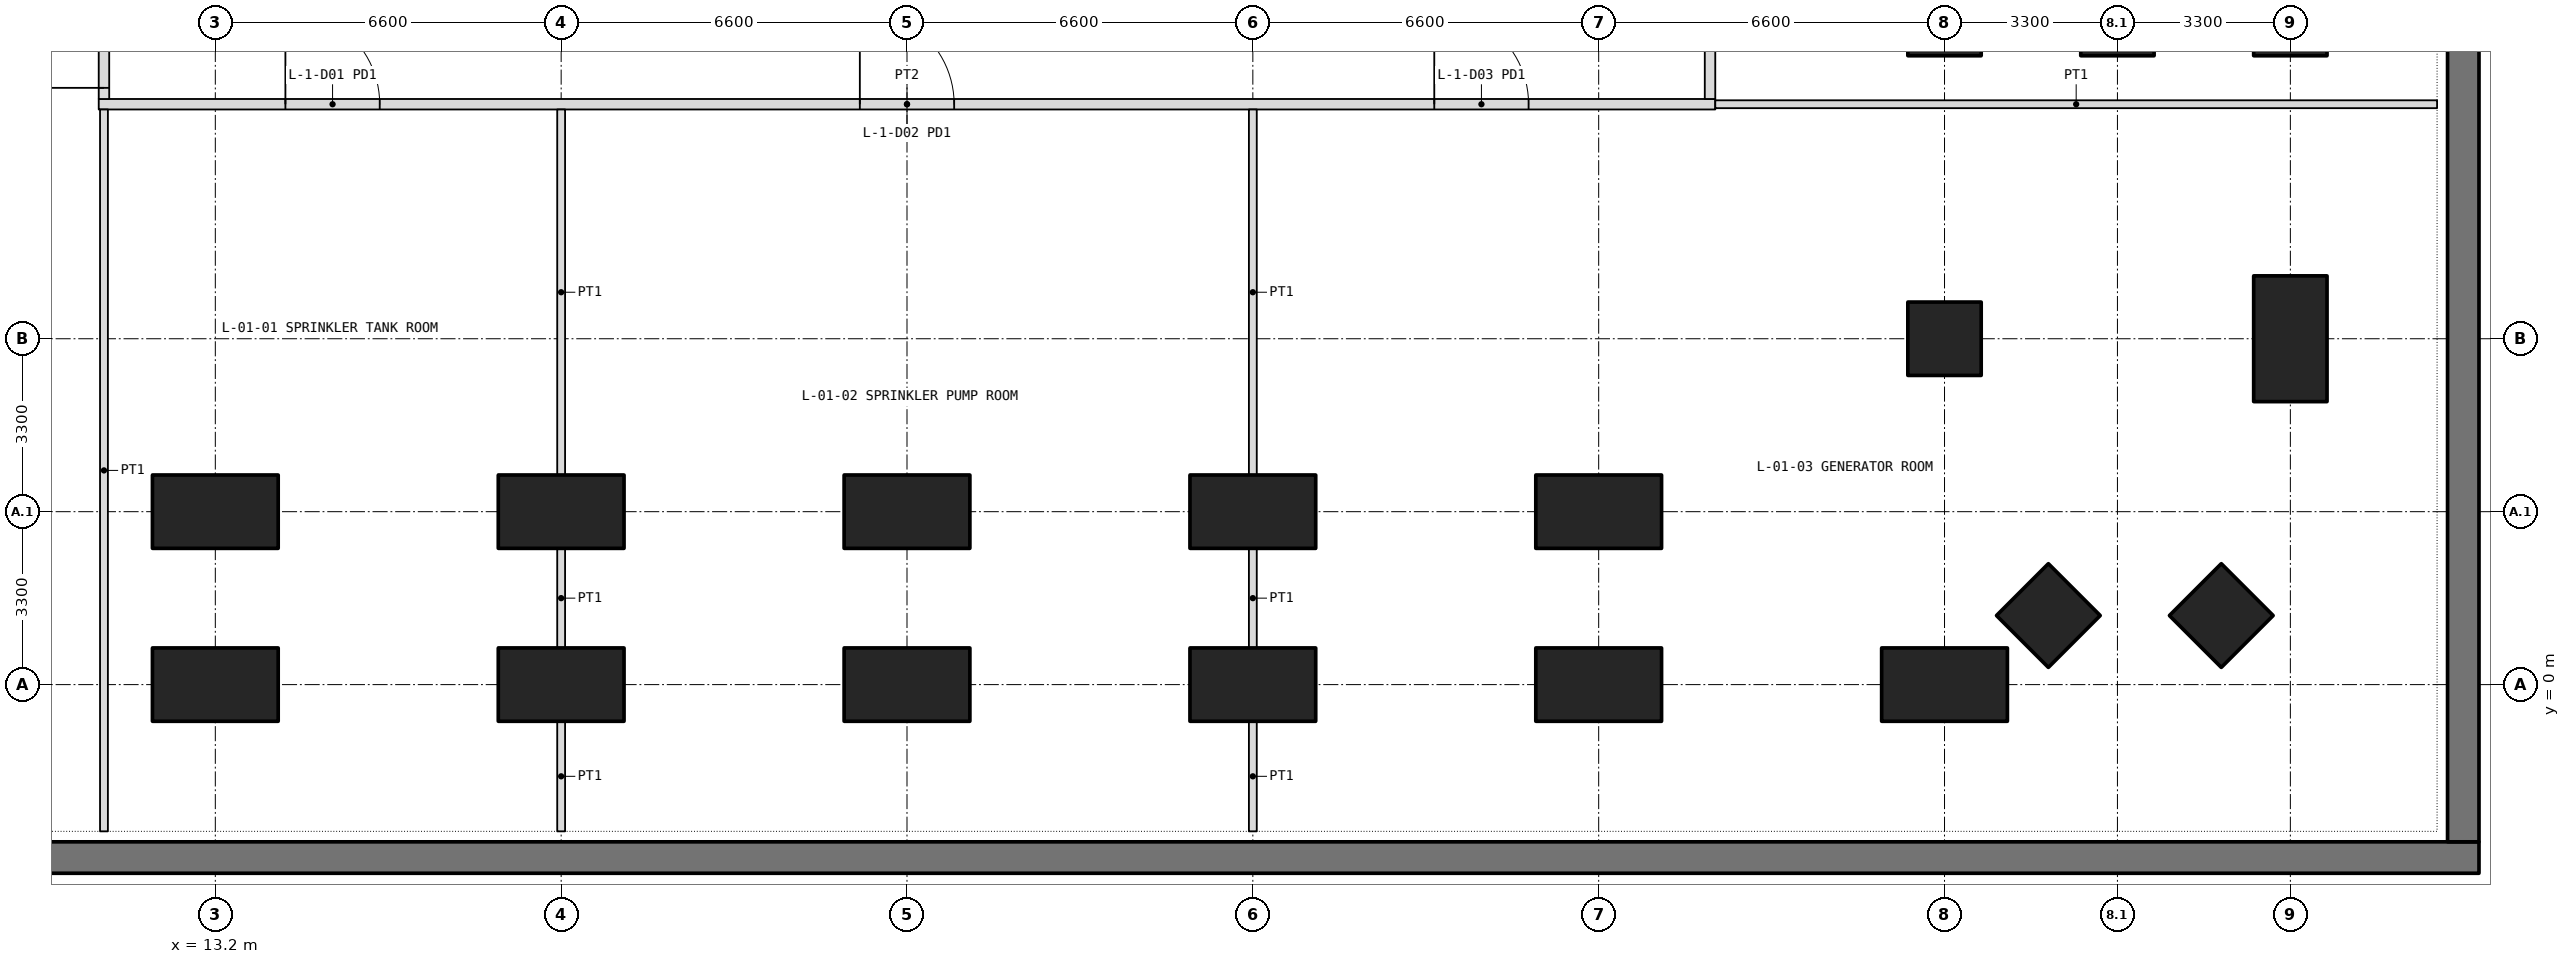
"""IFC4 building model, lengths in metres.
Left out: names, types, materials, properties, quantities, classifications, styles, units other than length and angle.
Written with IfcOpenShell. Run it as: python <this file> out.ifc"""

import sys

from ifc_helpers import new_model, si_unit, direction, frame, frame_2d, origin, origin_2d, place, context, subcontext, project, spatial, rectangle, extrude, element, fill, save


model = new_model("IFC4")
c1 = context("Model", 3, precision=1e-05, world=origin(), true_north=direction((0.0, 1.0)))
c2 = subcontext(c1, "Body", "Model", "MODEL_VIEW")
j1 = project(units=[si_unit("LENGTHUNIT", "METRE"), si_unit("PLANEANGLEUNIT", "RADIAN")], contexts=[c1])
p1 = place(None, origin())
s1 = spatial("IfcSite", under=j1, at=p1, CompositionType="ELEMENT")
p2 = place(p1, origin())
s2 = spatial("IfcBuilding", under=s1, at=p2, CompositionType="ELEMENT")
p3 = place(p2, frame((0.0, 0.0, -5.4)))
s3 = spatial("IfcBuildingStorey", under=s2, at=p3, CompositionType="ELEMENT", Elevation=-5.4)
p4 = place(p3, frame((-3.6, -3.3, -0.15), z_axis=(0.0, 0.0, 1.0), x_axis=(1.0, 0.0, 0.0)))
e1 = element("IfcWall", 1, at=p4, inside=s3, PredefinedType="SOLIDWALL", context=c2, shape_type="SweptSolid", body=[
    extrude(rectangle(XDim=60.0, YDim=0.6, at=frame_2d((30.0, 0.0))), origin(), (0.0, 0.0, 1.0), 5.2),
])
p5 = place(p3, frame((56.1, -3.0, -0.15), z_axis=(0.0, 0.0, 1.0), x_axis=(0.0, 1.0, 0.0)))
e2 = element("IfcWall", 2, at=p5, inside=s3, PredefinedType="SOLIDWALL", context=c2, shape_type="SweptSolid", body=[
    extrude(rectangle(XDim=52.2, YDim=0.6, at=frame_2d((26.1, 0.0))), origin(), (0.0, 0.0, 1.0), 5.2),
])
p6 = place(p3, frame((51.482, 1.318, -0.15), z_axis=(0.0, 0.0, 1.0), x_axis=(0.707106781187, 0.707106781187, 0.0)))
e3 = element("IfcColumn", 3, at=p6, inside=s3, PredefinedType="COLUMN", context=c2, shape_type="SweptSolid", body=[
    extrude(rectangle(XDim=1.4, YDim=1.4, at=origin_2d()), origin(), (0.0, 0.0, 1.0), 5.55),
])
for number, where, z_axis, x_axis in (
    (4, (13.2, 0.0, -0.15), (0.0, 0.0, 1.0), (1.0, 0.0, 0.0)),
    (5, (19.8, 0.0, -0.15), (0.0, 0.0, 1.0), (1.0, 0.0, 0.0)),
    (6, (26.4, 0.0, -0.15), (0.0, 0.0, 1.0), (1.0, 0.0, 0.0)),
    (7, (33.0, 0.0, -0.15), (0.0, 0.0, 1.0), (1.0, 0.0, 0.0)),
    (8, (39.6, 0.0, -0.15), (0.0, 0.0, 1.0), (1.0, 0.0, 0.0)),
    (9, (46.2, 0.0, -0.15), (0.0, 0.0, 1.0), (1.0, 0.0, 0.0)),
    (10, (52.8, 6.6, -0.15), (0.0, 0.0, 1.0), (0.0, 1.0, 0.0)),
    (11, (52.8, 13.2, -0.15), (0.0, 0.0, 1.0), (0.0, 1.0, 0.0)),
):
    element("IfcColumn", number, at=place(p3, frame(where, z_axis=z_axis, x_axis=x_axis)), inside=s3, PredefinedType="COLUMN", context=c2, shape_type="SweptSolid", body=[
        extrude(rectangle(XDim=2.4, YDim=1.4, at=origin_2d()), origin(), (0.0, 0.0, 1.0), 5.55),
    ])
for number, where, z_axis, x_axis in (
    (12, (46.2, 6.6, -0.15), (0.0, 0.0, 1.0), (1.0, 0.0, 0.0)),
    (13, (48.182, 1.318, -0.15), (0.0, 0.0, 1.0), (0.707, 0.707, 0.0)),
):
    element("IfcColumn", number, at=place(p3, frame(where, z_axis=z_axis, x_axis=x_axis)), inside=s3, PredefinedType="COLUMN", context=c2, shape_type="SweptSolid", body=[
        extrude(rectangle(XDim=1.4, YDim=1.4, at=origin_2d()), origin(), (0.0, 0.0, 1.0), 5.55),
    ])
for number, where, z_axis, x_axis in (
    (14, (49.5, 13.2, -0.15), (0.0, 0.0, 1.0), (0.0, 1.0, 0.0)),
    (15, (13.2, 3.3, -0.15), (0.0, 0.0, 1.0), (1.0, 0.0, 0.0)),
    (16, (19.8, 3.3, -0.15), (0.0, 0.0, 1.0), (1.0, 0.0, 0.0)),
    (17, (26.4, 3.3, -0.15), (0.0, 0.0, 1.0), (1.0, 0.0, 0.0)),
    (18, (33.0, 3.3, -0.15), (0.0, 0.0, 1.0), (1.0, 0.0, 0.0)),
    (19, (39.6, 3.3, -0.15), (0.0, 0.0, 1.0), (1.0, 0.0, 0.0)),
    (20, (46.2, 13.2, -0.15), (0.0, 0.0, 1.0), (0.0, 1.0, 0.0)),
):
    element("IfcColumn", number, at=place(p3, frame(where, z_axis=z_axis, x_axis=x_axis)), inside=s3, PredefinedType="COLUMN", context=c2, shape_type="SweptSolid", body=[
        extrude(rectangle(XDim=2.4, YDim=1.4, at=origin_2d()), origin(), (0.0, 0.0, 1.0), 5.55),
    ])
p7 = place(p3, frame((10.975, 11.075, 0.0), z_axis=(0.0, 0.0, 1.0), x_axis=(1.0, 0.0, 0.0)))
e21 = element("IfcWall", 21, at=p7, inside=s3, PredefinedType="PARTITIONING", context=c2, shape_type="SweptSolid", body=[
    extrude(rectangle(XDim=30.85, YDim=0.2, at=frame_2d((15.425, 0.0))), origin(), (0.0, 0.0, 1.0), 4.05),
])
p8 = place(p7, frame((3.562, 0.0, 0.0)))
e22 = element("IfcOpeningElement", 22, at=p8, cuts=e21, PredefinedType="OPENING", context=c2, shape_type="SweptSolid", body=[
    extrude(rectangle(XDim=1.8, YDim=2.4, at=frame_2d((0.9, 1.2))), frame((0.0, 0.11, 0.0), z_axis=(0.0, -1.0, 0.0), x_axis=(1.0, 0.0, 0.0)), (0.0, 0.0, 1.0), 0.22),
])
p9 = place(p7, frame((14.525, 0.0, 0.0)))
e23 = element("IfcOpeningElement", 23, at=p9, cuts=e21, PredefinedType="OPENING", context=c2, shape_type="SweptSolid", body=[
    extrude(rectangle(XDim=1.8, YDim=2.4, at=frame_2d((0.9, 1.2))), frame((0.0, 0.11, 0.0), z_axis=(0.0, -1.0, 0.0), x_axis=(1.0, 0.0, 0.0)), (0.0, 0.0, 1.0), 0.22),
])
p10 = place(p7, frame((25.488, 0.0, 0.0)))
e24 = element("IfcOpeningElement", 24, at=p10, cuts=e21, PredefinedType="OPENING", context=c2, shape_type="SweptSolid", body=[
    extrude(rectangle(XDim=1.8, YDim=2.4, at=frame_2d((0.9, 1.2))), frame((0.0, 0.11, 0.0), z_axis=(0.0, -1.0, 0.0), x_axis=(1.0, 0.0, 0.0)), (0.0, 0.0, 1.0), 0.22),
])
p11 = place(p3, frame((11.075, 11.175, 0.0), z_axis=(0.0, 0.0, 1.0), x_axis=(0.0, 1.0, 0.0)))
e25 = element("IfcWall", 25, at=p11, inside=s3, PredefinedType="PARTITIONING", context=c2, shape_type="SweptSolid", body=[
    extrude(rectangle(XDim=23.85, YDim=0.2, at=frame_2d((11.925, 0.0))), origin(), (0.0, 0.0, 1.0), 4.05),
])
p12 = place(p11, frame((0.212, 0.0, 0.0)))
e26 = element("IfcOpeningElement", 26, at=p12, cuts=e25, PredefinedType="OPENING", context=c2, shape_type="SweptSolid", body=[
    extrude(rectangle(XDim=1.8, YDim=2.4, at=frame_2d((0.9, 1.2))), frame((0.0, 0.11, 0.0), z_axis=(0.0, -1.0, 0.0), x_axis=(1.0, 0.0, 0.0)), (0.0, 0.0, 1.0), 0.22),
])
p13 = place(p11, frame((2.575, 0.0, 0.0)))
e27 = element("IfcOpeningElement", 27, at=p13, cuts=e25, PredefinedType="OPENING", context=c2, shape_type="SweptSolid", body=[
    extrude(rectangle(XDim=1.0, YDim=2.1, at=frame_2d((0.5, 1.05))), frame((0.0, 0.11, 0.0), z_axis=(0.0, -1.0, 0.0), x_axis=(1.0, 0.0, 0.0)), (0.0, 0.0, 1.0), 0.22),
])
p14 = place(p11, frame((5.675, 0.0, 0.0)))
e28 = element("IfcOpeningElement", 28, at=p14, cuts=e25, PredefinedType="OPENING", context=c2, shape_type="SweptSolid", body=[
    extrude(rectangle(XDim=0.9, YDim=2.1, at=frame_2d((0.45, 1.05))), frame((0.0, 0.11, 0.0), z_axis=(0.0, -1.0, 0.0), x_axis=(1.0, 0.0, 0.0)), (0.0, 0.0, 1.0), 0.22),
])
p15 = place(p11, frame((9.575, 0.0, 0.0)))
e29 = element("IfcOpeningElement", 29, at=p15, cuts=e25, PredefinedType="OPENING", context=c2, shape_type="SweptSolid", body=[
    extrude(rectangle(XDim=0.9, YDim=2.1, at=frame_2d((0.45, 1.05))), frame((0.0, 0.11, 0.0), z_axis=(0.0, -1.0, 0.0), x_axis=(1.0, 0.0, 0.0)), (0.0, 0.0, 1.0), 0.22),
])
p16 = place(p11, frame((12.675, 0.0, 0.0)))
e30 = element("IfcOpeningElement", 30, at=p16, cuts=e25, PredefinedType="OPENING", context=c2, shape_type="SweptSolid", body=[
    extrude(rectangle(XDim=1.8, YDim=2.4, at=frame_2d((0.9, 1.2))), frame((0.0, 0.11, 0.0), z_axis=(0.0, -1.0, 0.0), x_axis=(1.0, 0.0, 0.0)), (0.0, 0.0, 1.0), 0.22),
])
p17 = place(p11, frame((19.087, 0.0, 0.0)))
e31 = element("IfcOpeningElement", 31, at=p17, cuts=e25, PredefinedType="OPENING", context=c2, shape_type="SweptSolid", body=[
    extrude(rectangle(XDim=1.0, YDim=2.1, at=frame_2d((0.5, 1.05))), frame((0.0, 0.11, 0.0), z_axis=(0.0, -1.0, 0.0), x_axis=(1.0, 0.0, 0.0)), (0.0, 0.0, 1.0), 0.22),
])
p18 = place(p3, frame((41.725, 11.175, 0.0), z_axis=(0.0, 0.0, 1.0), x_axis=(0.0, 1.0, 0.0)))
e32 = element("IfcWall", 32, at=p18, inside=s3, PredefinedType="PARTITIONING", context=c2, shape_type="SweptSolid", body=[
    extrude(rectangle(XDim=23.85, YDim=0.2, at=frame_2d((11.925, 0.0))), origin(), (0.0, 0.0, 1.0), 4.05),
])
p19 = place(p18, frame((3.363, 0.0, 0.0)))
e33 = element("IfcOpeningElement", 33, at=p19, cuts=e32, PredefinedType="OPENING", context=c2, shape_type="SweptSolid", body=[
    extrude(rectangle(XDim=1.8, YDim=2.4, at=frame_2d((0.9, 1.2))), frame((0.0, 0.11, 0.0), z_axis=(0.0, -1.0, 0.0), x_axis=(1.0, 0.0, 0.0)), (0.0, 0.0, 1.0), 0.22),
])
p20 = place(p18, frame((9.625, 0.0, 0.0)))
e34 = element("IfcOpeningElement", 34, at=p20, cuts=e32, PredefinedType="OPENING", context=c2, shape_type="SweptSolid", body=[
    extrude(rectangle(XDim=1.0, YDim=2.1, at=frame_2d((0.5, 1.05))), frame((0.0, 0.11, 0.0), z_axis=(0.0, -1.0, 0.0), x_axis=(1.0, 0.0, 0.0)), (0.0, 0.0, 1.0), 0.22),
])
p21 = place(p18, frame((12.975, 0.0, 0.0)))
e35 = element("IfcOpeningElement", 35, at=p21, cuts=e32, PredefinedType="OPENING", context=c2, shape_type="SweptSolid", body=[
    extrude(rectangle(XDim=0.9, YDim=2.1, at=frame_2d((0.45, 1.05))), frame((0.0, 0.11, 0.0), z_axis=(0.0, -1.0, 0.0), x_axis=(1.0, 0.0, 0.0)), (0.0, 0.0, 1.0), 0.22),
])
p22 = place(p18, frame((18.025, 0.0, 0.0)))
e36 = element("IfcOpeningElement", 36, at=p22, cuts=e32, PredefinedType="OPENING", context=c2, shape_type="SweptSolid", body=[
    extrude(rectangle(XDim=1.0, YDim=2.1, at=frame_2d((0.5, 1.05))), frame((0.0, 0.11, 0.0), z_axis=(0.0, -1.0, 0.0), x_axis=(1.0, 0.0, 0.0)), (0.0, 0.0, 1.0), 0.22),
])
p23 = place(p18, frame((22.387, 0.0, 0.0)))
e37 = element("IfcOpeningElement", 37, at=p23, cuts=e32, PredefinedType="OPENING", context=c2, shape_type="SweptSolid", body=[
    extrude(rectangle(XDim=1.0, YDim=2.1, at=frame_2d((0.5, 1.05))), frame((0.0, 0.11, 0.0), z_axis=(0.0, -1.0, 0.0), x_axis=(1.0, 0.0, 0.0)), (0.0, 0.0, 1.0), 0.22),
])
for number, where, z_axis, x_axis in (
    (38, (11.075, -2.8, 0.0), (0.0, 0.0, 1.0), (0.0, 1.0, 0.0)),
    (39, (55.6, 11.075, 0.0), (0.0, 0.0, 1.0), (-1.0, 0.0, 0.0)),
):
    element("IfcWall", number, at=place(p3, frame(where, z_axis=z_axis, x_axis=x_axis)), inside=s3, PredefinedType="PARTITIONING", context=c2, shape_type="SweptSolid", body=[
        extrude(rectangle(XDim=13.775, YDim=0.15, at=frame_2d((6.888, 0.0))), origin(), (0.0, 0.0, 1.0), 3.85),
    ])
p24 = place(p3, frame((19.8, -2.8, 0.0), z_axis=(0.0, 0.0, 1.0), x_axis=(0.0, 1.0, 0.0)))
e40 = element("IfcWall", 40, at=p24, inside=s3, PredefinedType="PARTITIONING", context=c2, shape_type="SweptSolid", body=[
    extrude(rectangle(XDim=2.1, YDim=0.15, at=frame_2d((1.05, 0.0))), origin(), (0.0, 0.0, 1.0), 4.05),
])
p25 = place(p3, frame((19.8, 0.7, 0.0), z_axis=(0.0, 0.0, 1.0), x_axis=(0.0, 1.0, 0.0)))
e41 = element("IfcWall", 41, at=p25, inside=s3, PredefinedType="PARTITIONING", context=c2, shape_type="SweptSolid", body=[
    extrude(rectangle(XDim=1.9, YDim=0.15, at=frame_2d((0.95, 0.0))), origin(), (0.0, 0.0, 1.0), 4.05),
])
p26 = place(p3, frame((19.8, 4.0, 0.0), z_axis=(0.0, 0.0, 1.0), x_axis=(0.0, 1.0, 0.0)))
e42 = element("IfcWall", 42, at=p26, inside=s3, PredefinedType="PARTITIONING", context=c2, shape_type="SweptSolid", body=[
    extrude(rectangle(XDim=6.975, YDim=0.15, at=frame_2d((3.488, 0.0))), origin(), (0.0, 0.0, 1.0), 4.05),
])
p27 = place(p3, frame((33.0, -2.8, 0.0), z_axis=(0.0, 0.0, 1.0), x_axis=(0.0, 1.0, 0.0)))
e43 = element("IfcWall", 43, at=p27, inside=s3, PredefinedType="PARTITIONING", context=c2, shape_type="SweptSolid", body=[
    extrude(rectangle(XDim=2.1, YDim=0.15, at=frame_2d((1.05, 0.0))), origin(), (0.0, 0.0, 1.0), 4.05),
])
p28 = place(p3, frame((33.0, 0.7, 0.0), z_axis=(0.0, 0.0, 1.0), x_axis=(0.0, 1.0, 0.0)))
e44 = element("IfcWall", 44, at=p28, inside=s3, PredefinedType="PARTITIONING", context=c2, shape_type="SweptSolid", body=[
    extrude(rectangle(XDim=1.9, YDim=0.15, at=frame_2d((0.95, 0.0))), origin(), (0.0, 0.0, 1.0), 4.05),
])
p29 = place(p3, frame((33.0, 4.0, 0.0), z_axis=(0.0, 0.0, 1.0), x_axis=(0.0, 1.0, 0.0)))
e45 = element("IfcWall", 45, at=p29, inside=s3, PredefinedType="PARTITIONING", context=c2, shape_type="SweptSolid", body=[
    extrude(rectangle(XDim=6.975, YDim=0.15, at=frame_2d((3.488, 0.0))), origin(), (0.0, 0.0, 1.0), 4.05),
])
p30 = place(p8, origin())
e46 = element("IfcDoor", 46, at=p30, inside=s3, OperationType="DOUBLE_DOOR_SINGLE_SWING", PredefinedType="DOOR", context=c2, shape_type="SweptSolid", body=[
    extrude(rectangle(XDim=1.8, YDim=2.4, at=frame_2d((0.9, 1.2))), frame((0.0, 0.025, 0.0), z_axis=(0.0, -1.0, 0.0), x_axis=(1.0, 0.0, 0.0)), (0.0, 0.0, 1.0), 0.05),
])
fill(e22, e46)
p31 = place(p9, origin())
e47 = element("IfcDoor", 47, at=p31, inside=s3, OperationType="DOUBLE_DOOR_SINGLE_SWING", PredefinedType="DOOR", context=c2, shape_type="SweptSolid", body=[
    extrude(rectangle(XDim=1.8, YDim=2.4, at=frame_2d((0.9, 1.2))), frame((0.0, 0.025, 0.0), z_axis=(0.0, -1.0, 0.0), x_axis=(1.0, 0.0, 0.0)), (0.0, 0.0, 1.0), 0.05),
])
fill(e23, e47)
p32 = place(p10, origin())
e48 = element("IfcDoor", 48, at=p32, inside=s3, OperationType="DOUBLE_DOOR_SINGLE_SWING", PredefinedType="DOOR", context=c2, shape_type="SweptSolid", body=[
    extrude(rectangle(XDim=1.8, YDim=2.4, at=frame_2d((0.9, 1.2))), frame((0.0, 0.025, 0.0), z_axis=(0.0, -1.0, 0.0), x_axis=(1.0, 0.0, 0.0)), (0.0, 0.0, 1.0), 0.05),
])
fill(e24, e48)
p33 = place(p12, origin())
e49 = element("IfcDoor", 49, at=p33, inside=s3, OperationType="DOUBLE_DOOR_SINGLE_SWING", PredefinedType="DOOR", context=c2, shape_type="SweptSolid", body=[
    extrude(rectangle(XDim=1.8, YDim=2.4, at=frame_2d((0.9, 1.2))), frame((0.0, 0.025, 0.0), z_axis=(0.0, -1.0, 0.0), x_axis=(1.0, 0.0, 0.0)), (0.0, 0.0, 1.0), 0.05),
])
fill(e26, e49)
save(model, sys.argv[1])
